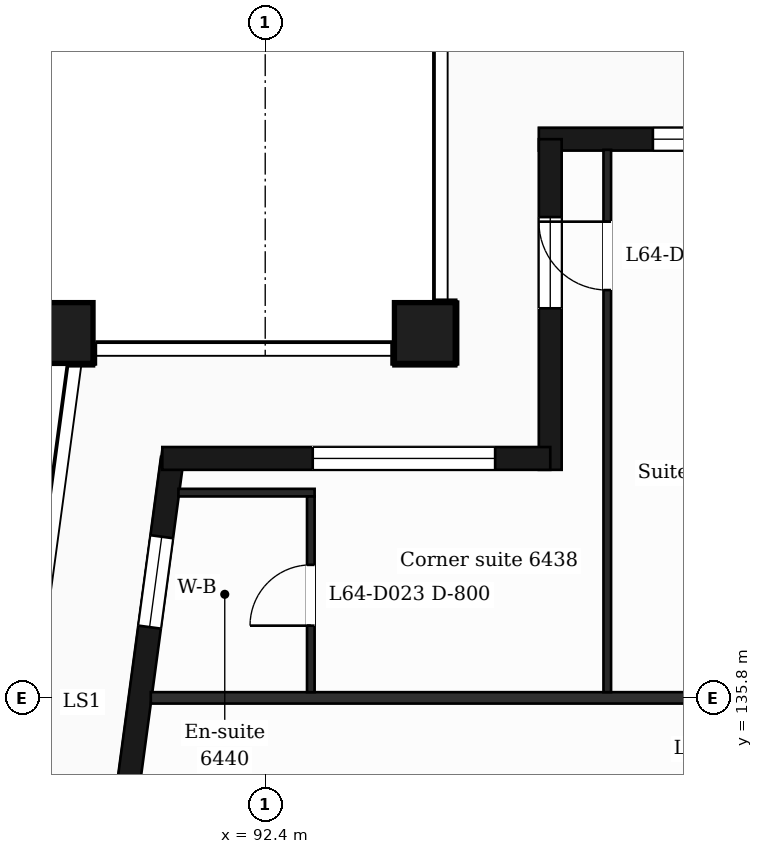
"""IFC4 building model, lengths in metres.
Left out: names, types, materials, properties, quantities, classifications, styles, units other than length and angle.
Written with IfcOpenShell. Run it as: python <this file> out.ifc"""

import sys

from ifc_helpers import new_model, si_unit, direction, frame, frame_2d, origin, origin_2d, place, context, subcontext, project, spatial, rectangle, extrude, element, fill, save


model = new_model("IFC4")
c1 = context("Model", 3, precision=1e-05, world=origin(), true_north=direction((0.0, 1.0)))
c2 = subcontext(c1, "Body", "Model", "MODEL_VIEW")
j1 = project(units=[si_unit("LENGTHUNIT", "METRE"), si_unit("PLANEANGLEUNIT", "RADIAN")], contexts=[c1])
p1 = place(None, origin())
s1 = spatial("IfcSite", under=j1, at=p1, CompositionType="ELEMENT")
p2 = place(p1, origin())
s2 = spatial("IfcBuilding", under=s1, at=p2, CompositionType="ELEMENT")
p3 = place(p2, frame((0.0, 0.0, 266.4)))
s3 = spatial("IfcBuildingStorey", under=s2, at=p3, CompositionType="ELEMENT", Elevation=266.4)
for number, where, z_axis, x_axis in (
    (1, (94.5, 140.6, 0.0), (0.0, 0.0, 1.0), (1.0, 0.0, 0.0)),
    (2, (89.735, 140.6, 0.0), (0.0, 0.0, 1.0), (1.0, 0.0, 0.0)),
):
    element("IfcColumn", number, at=place(p3, frame(where, z_axis=z_axis, x_axis=x_axis)), inside=s3, PredefinedType="COLUMN", context=c2, shape_type="SweptSolid", body=[
        extrude(rectangle(XDim=0.8, YDim=0.8, at=origin_2d()), origin(), (0.0, 0.0, 1.0), 3.7),
    ])
p4 = place(p3, frame((91.177, 138.95, 0.0), z_axis=(0.0, 0.0, 1.0), x_axis=(-0.133426664613, -0.991058689065, 0.0)))
e3 = element("IfcWall", 3, at=p4, inside=s3, PredefinedType="SOLIDWALL", context=c2, shape_type="SweptSolid", body=[
    extrude(rectangle(XDim=6.609, YDim=0.3, at=frame_2d((3.305, 0.0))), origin(), (0.0, 0.0, 1.0), 3.38),
])
p5 = place(p4, frame((1.039, 0.0, 0.9)))
e4 = element("IfcOpeningElement", 4, at=p5, cuts=e3, PredefinedType="OPENING", context=c2, shape_type="SweptSolid", body=[
    extrude(rectangle(XDim=1.2, YDim=2.1, at=frame_2d((0.6, 1.05))), frame((0.0, 0.16, 0.0), z_axis=(0.0, -1.0, 0.0), x_axis=(1.0, 0.0, 0.0)), (0.0, 0.0, 1.0), 0.32),
])
p6 = place(p4, frame((4.294, 0.0, 0.0)))
e5 = element("IfcOpeningElement", 5, at=p6, cuts=e3, PredefinedType="OPENING", context=c2, shape_type="SweptSolid", body=[
    extrude(rectangle(XDim=1.2, YDim=2.4, at=frame_2d((0.6, 1.2))), frame((0.0, 0.16, 0.0), z_axis=(0.0, -1.0, 0.0), x_axis=(1.0, 0.0, 0.0)), (0.0, 0.0, 1.0), 0.32),
])
p7 = place(p3, frame((110.4, 143.15, 0.0), z_axis=(0.0, 0.0, 1.0), x_axis=(-1.0, 0.0, 0.0)))
e6 = element("IfcWall", 6, at=p7, inside=s3, PredefinedType="SOLIDWALL", context=c2, shape_type="SweptSolid", body=[
    extrude(rectangle(XDim=14.4, YDim=0.3, at=frame_2d((7.2, 0.0))), origin(), (0.0, 0.0, 1.0), 3.38),
])
p8 = place(p7, frame((2.7, 0.0, 0.9)))
e7 = element("IfcOpeningElement", 7, at=p8, cuts=e6, PredefinedType="OPENING", context=c2, shape_type="SweptSolid", body=[
    extrude(rectangle(XDim=1.2, YDim=2.1, at=frame_2d((0.6, 1.05))), frame((0.0, 0.16, 0.0), z_axis=(0.0, -1.0, 0.0), x_axis=(1.0, 0.0, 0.0)), (0.0, 0.0, 1.0), 0.32),
])
p9 = place(p7, frame((6.9, 0.0, 0.0)))
e8 = element("IfcOpeningElement", 8, at=p9, cuts=e6, PredefinedType="OPENING", context=c2, shape_type="SweptSolid", body=[
    extrude(rectangle(XDim=1.2, YDim=2.4, at=frame_2d((0.6, 1.2))), frame((0.0, 0.16, 0.0), z_axis=(0.0, -1.0, 0.0), x_axis=(1.0, 0.0, 0.0)), (0.0, 0.0, 1.0), 0.32),
])
p10 = place(p7, frame((10.5, 0.0, 0.9)))
e9 = element("IfcOpeningElement", 9, at=p10, cuts=e6, PredefinedType="OPENING", context=c2, shape_type="SweptSolid", body=[
    extrude(rectangle(XDim=2.4, YDim=2.1, at=frame_2d((1.2, 1.05))), frame((0.0, 0.16, 0.0), z_axis=(0.0, -1.0, 0.0), x_axis=(1.0, 0.0, 0.0)), (0.0, 0.0, 1.0), 0.32),
])
p11 = place(p3, frame((96.15, 143.15, 0.0), z_axis=(0.0, 0.0, 1.0), x_axis=(0.0, -1.0, 0.0)))
e10 = element("IfcWall", 10, at=p11, inside=s3, PredefinedType="SOLIDWALL", context=c2, shape_type="SweptSolid", body=[
    extrude(rectangle(XDim=4.35, YDim=0.3, at=frame_2d((2.175, 0.0))), origin(), (0.0, 0.0, 1.0), 3.38),
])
p12 = place(p11, frame((1.025, 0.0, 0.9)))
e11 = element("IfcOpeningElement", 11, at=p12, cuts=e10, PredefinedType="OPENING", context=c2, shape_type="SweptSolid", body=[
    extrude(rectangle(XDim=1.2, YDim=2.1, at=frame_2d((0.6, 1.05))), frame((0.0, 0.16, 0.0), z_axis=(0.0, -1.0, 0.0), x_axis=(1.0, 0.0, 0.0)), (0.0, 0.0, 1.0), 0.32),
])
p13 = place(p3, frame((96.15, 138.95, 0.0), z_axis=(0.0, 0.0, 1.0), x_axis=(-1.0, 0.0, 0.0)))
e12 = element("IfcWall", 12, at=p13, inside=s3, PredefinedType="SOLIDWALL", context=c2, shape_type="SweptSolid", body=[
    extrude(rectangle(XDim=5.104, YDim=0.3, at=frame_2d((2.552, 0.0))), origin(), (0.0, 0.0, 1.0), 3.38),
])
p14 = place(p13, frame((0.725, 0.0, 0.9)))
e13 = element("IfcOpeningElement", 13, at=p14, cuts=e12, PredefinedType="OPENING", context=c2, shape_type="SweptSolid", body=[
    extrude(rectangle(XDim=2.4, YDim=2.1, at=frame_2d((1.2, 1.05))), frame((0.0, 0.16, 0.0), z_axis=(0.0, -1.0, 0.0), x_axis=(1.0, 0.0, 0.0)), (0.0, 0.0, 1.0), 0.32),
])
p15 = place(p3, frame((90.895, 135.8, 0.0), z_axis=(0.0, 0.0, 1.0), x_axis=(1.0, 0.0, 0.0)))
e14 = element("IfcWall", 14, at=p15, inside=s3, PredefinedType="PARTITIONING", context=c2, shape_type="SweptSolid", body=[
    extrude(rectangle(XDim=45.011, YDim=0.15, at=frame_2d((22.505, 0.0))), origin(), (0.0, 0.0, 1.0), 3.38),
])
p16 = place(p15, frame((8.005, 0.0, 0.0)))
e15 = element("IfcOpeningElement", 15, at=p16, cuts=e14, PredefinedType="OPENING", context=c2, shape_type="SweptSolid", body=[
    extrude(rectangle(XDim=1.0, YDim=2.1, at=frame_2d((0.5, 1.05))), frame((0.0, 0.085, 0.0), z_axis=(0.0, -1.0, 0.0), x_axis=(1.0, 0.0, 0.0)), (0.0, 0.0, 1.0), 0.17),
])
p17 = place(p15, frame((11.93, 0.0, 0.0)))
e16 = element("IfcOpeningElement", 16, at=p17, cuts=e14, PredefinedType="OPENING", context=c2, shape_type="SweptSolid", body=[
    extrude(rectangle(XDim=1.0, YDim=2.1, at=frame_2d((0.5, 1.05))), frame((0.0, 0.085, 0.0), z_axis=(0.0, -1.0, 0.0), x_axis=(1.0, 0.0, 0.0)), (0.0, 0.0, 1.0), 0.17),
])
p18 = place(p15, frame((22.755, 0.0, 0.0)))
e17 = element("IfcOpeningElement", 17, at=p18, cuts=e14, PredefinedType="OPENING", context=c2, shape_type="SweptSolid", body=[
    extrude(rectangle(XDim=1.0, YDim=2.1, at=frame_2d((0.5, 1.05))), frame((0.0, 0.085, 0.0), z_axis=(0.0, -1.0, 0.0), x_axis=(1.0, 0.0, 0.0)), (0.0, 0.0, 1.0), 0.17),
])
p19 = place(p15, frame((28.305, 0.0, 0.0)))
e18 = element("IfcOpeningElement", 18, at=p19, cuts=e14, PredefinedType="OPENING", context=c2, shape_type="SweptSolid", body=[
    extrude(rectangle(XDim=1.0, YDim=2.1, at=frame_2d((0.5, 1.05))), frame((0.0, 0.085, 0.0), z_axis=(0.0, -1.0, 0.0), x_axis=(1.0, 0.0, 0.0)), (0.0, 0.0, 1.0), 0.17),
])
p20 = place(p15, frame((37.615, 0.0, 0.0)))
e19 = element("IfcOpeningElement", 19, at=p20, cuts=e14, PredefinedType="OPENING", context=c2, shape_type="SweptSolid", body=[
    extrude(rectangle(XDim=1.0, YDim=2.1, at=frame_2d((0.5, 1.05))), frame((0.0, 0.085, 0.0), z_axis=(0.0, -1.0, 0.0), x_axis=(1.0, 0.0, 0.0)), (0.0, 0.0, 1.0), 0.17),
])
p21 = place(p3, frame((91.258, 138.5, 0.0), z_axis=(0.0, 0.0, 1.0), x_axis=(1.0, 0.0, 0.0)))
e20 = element("IfcWall", 20, at=p21, inside=s3, PredefinedType="PARTITIONING", context=c2, shape_type="SweptSolid", body=[
    extrude(rectangle(XDim=1.792, YDim=0.1, at=frame_2d((0.896, 0.0))), origin(), (0.0, 0.0, 1.0), 3.38),
])
p22 = place(p3, frame((93.0, 135.875, 0.0), z_axis=(0.0, 0.0, 1.0), x_axis=(0.0, 1.0, 0.0)))
e21 = element("IfcWall", 21, at=p22, inside=s3, PredefinedType="PARTITIONING", context=c2, shape_type="SweptSolid", body=[
    extrude(rectangle(XDim=2.575, YDim=0.1, at=frame_2d((1.288, 0.0))), origin(), (0.0, 0.0, 1.0), 3.38),
])
p23 = place(p22, frame((0.875, 0.0, 0.0)))
e22 = element("IfcOpeningElement", 22, at=p23, cuts=e21, PredefinedType="OPENING", context=c2, shape_type="SweptSolid", body=[
    extrude(rectangle(XDim=0.8, YDim=2.1, at=frame_2d((0.4, 1.05))), frame((0.0, 0.06, 0.0), z_axis=(0.0, -1.0, 0.0), x_axis=(1.0, 0.0, 0.0)), (0.0, 0.0, 1.0), 0.12),
])
p24 = place(p3, frame((96.9, 135.875, 0.0), z_axis=(0.0, 0.0, 1.0), x_axis=(0.0, 1.0, 0.0)))
e23 = element("IfcWall", 23, at=p24, inside=s3, PredefinedType="PARTITIONING", context=c2, shape_type="SweptSolid", body=[
    extrude(rectangle(XDim=7.135, YDim=0.1, at=frame_2d((3.567, 0.0))), origin(), (0.0, 0.0, 1.0), 3.38),
])
p25 = place(p24, frame((5.29, 0.0, 0.0)))
e24 = element("IfcOpeningElement", 24, at=p25, cuts=e23, PredefinedType="OPENING", context=c2, shape_type="SweptSolid", body=[
    extrude(rectangle(XDim=0.9, YDim=2.1, at=frame_2d((0.45, 1.05))), frame((0.0, 0.06, 0.0), z_axis=(0.0, -1.0, 0.0), x_axis=(1.0, 0.0, 0.0)), (0.0, 0.0, 1.0), 0.12),
])
p26 = place(p5, origin())
e25 = element("IfcWindow", 25, at=p26, inside=s3, PartitioningType="SINGLE_PANEL", PredefinedType="WINDOW", context=c2, shape_type="SweptSolid", body=[
    extrude(rectangle(XDim=1.2, YDim=2.1, at=frame_2d((0.6, 1.05))), frame((0.0, 0.03, 0.0), z_axis=(0.0, -1.0, 0.0), x_axis=(1.0, 0.0, 0.0)), (0.0, 0.0, 1.0), 0.06),
])
fill(e4, e25)
p27 = place(p10, origin())
e26 = element("IfcWindow", 26, at=p27, inside=s3, PartitioningType="SINGLE_PANEL", PredefinedType="WINDOW", context=c2, shape_type="SweptSolid", body=[
    extrude(rectangle(XDim=2.4, YDim=2.1, at=frame_2d((1.2, 1.05))), frame((0.0, 0.03, 0.0), z_axis=(0.0, -1.0, 0.0), x_axis=(1.0, 0.0, 0.0)), (0.0, 0.0, 1.0), 0.06),
])
fill(e9, e26)
p28 = place(p12, origin())
e27 = element("IfcWindow", 27, at=p28, inside=s3, PartitioningType="SINGLE_PANEL", PredefinedType="WINDOW", context=c2, shape_type="SweptSolid", body=[
    extrude(rectangle(XDim=1.2, YDim=2.1, at=frame_2d((0.6, 1.05))), frame((0.0, 0.03, 0.0), z_axis=(0.0, -1.0, 0.0), x_axis=(1.0, 0.0, 0.0)), (0.0, 0.0, 1.0), 0.06),
])
fill(e11, e27)
p29 = place(p14, origin())
e28 = element("IfcWindow", 28, at=p29, inside=s3, PartitioningType="SINGLE_PANEL", PredefinedType="WINDOW", context=c2, shape_type="SweptSolid", body=[
    extrude(rectangle(XDim=2.4, YDim=2.1, at=frame_2d((1.2, 1.05))), frame((0.0, 0.03, 0.0), z_axis=(0.0, -1.0, 0.0), x_axis=(1.0, 0.0, 0.0)), (0.0, 0.0, 1.0), 0.06),
])
fill(e13, e28)
p30 = place(p25, origin())
e29 = element("IfcDoor", 29, at=p30, inside=s3, OperationType="SINGLE_SWING_RIGHT", PredefinedType="DOOR", context=c2, shape_type="SweptSolid", body=[
    extrude(rectangle(XDim=0.9, YDim=2.1, at=frame_2d((0.45, 1.05))), frame((0.0, 0.025, 0.0), z_axis=(0.0, -1.0, 0.0), x_axis=(1.0, 0.0, 0.0)), (0.0, 0.0, 1.0), 0.05),
])
fill(e24, e29)
p31 = place(p23, origin())
e30 = element("IfcDoor", 30, at=p31, inside=s3, OperationType="SINGLE_SWING_LEFT", PredefinedType="DOOR", context=c2, shape_type="SweptSolid", body=[
    extrude(rectangle(XDim=0.8, YDim=2.1, at=frame_2d((0.4, 1.05))), frame((0.0, 0.025, 0.0), z_axis=(0.0, -1.0, 0.0), x_axis=(1.0, 0.0, 0.0)), (0.0, 0.0, 1.0), 0.05),
])
fill(e22, e30)
save(model, sys.argv[1])
